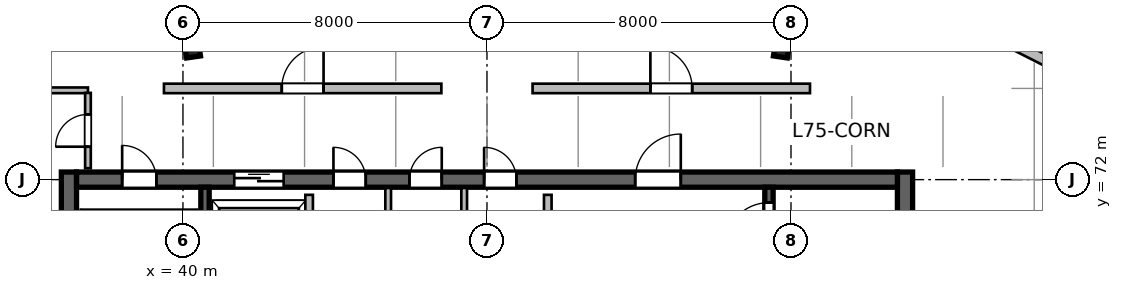
"""IFC4 building model, lengths in metres.
Left out: names, types, materials, properties, quantities, classifications, styles, units other than length and angle.
Written with IfcOpenShell. Run it as: python <this file> out.ifc"""

import sys

from ifc_helpers import new_model, si_unit, direction, frame, frame_2d, origin, origin_2d, place, context, subcontext, project, spatial, rectangle, i_section, extrude, source, transform, mapped, element, fill, save


model = new_model("IFC4")
c1 = context("Model", 3, precision=1e-05, world=origin(), true_north=direction((0.0, 1.0)))
c2 = subcontext(c1, "Body", "Model", "MODEL_VIEW")
j1 = project(units=[si_unit("LENGTHUNIT", "METRE"), si_unit("PLANEANGLEUNIT", "RADIAN")], contexts=[c1])
p1 = place(None, origin())
s1 = spatial("IfcSite", under=j1, at=p1, CompositionType="ELEMENT")
p2 = place(p1, origin())
s2 = spatial("IfcBuilding", under=s1, at=p2, CompositionType="ELEMENT")
p3 = place(p2, frame((0.0, 0.0, 307.8)))
s3 = spatial("IfcBuildingStorey", under=s2, at=p3, CompositionType="ELEMENT", Elevation=307.8)
m1 = source(origin(), c2, "Body", "SweptSolid", [
    extrude(rectangle(XDim=12.0, YDim=0.4, at=frame_2d((6.0, 0.0))), origin(), (0.0, 0.0, 1.0), 4.8),
])
for number, where, z_axis, x_axis in (
    (1, (37.0, 60.2, 0.0), (0.0, 0.0, 1.0), (0.0, 1.0, 0.0)),
    (2, (59.0, 60.2, 0.0), (0.0, 0.0, 1.0), (0.0, 1.0, 0.0)),
):
    element("IfcWall", number, at=place(p3, frame(where, z_axis=z_axis, x_axis=x_axis)), inside=s3, PredefinedType="SHEAR", context=c2, shape_type="MappedRepresentation", body=[
        mapped(m1, transform((0.0, 0.0, 0.0), scale=1.0)),
    ])
m2 = source(origin(), c2, "Body", "SweptSolid", [
    extrude(rectangle(XDim=21.6, YDim=0.4, at=frame_2d((10.8, 0.0))), origin(), (0.0, 0.0, 1.0), 4.8),
])
p4 = place(p3, frame((37.2, 72.0, 0.0), z_axis=(0.0, 0.0, 1.0), x_axis=(1.0, 0.0, 0.0)))
e3 = element("IfcWall", 3, at=p4, inside=s3, PredefinedType="SHEAR", context=c2, shape_type="MappedRepresentation", body=[
    mapped(m2, transform((0.0, 0.0, 0.0), scale=1.0)),
])
p5 = place(p4, frame((1.2, 0.0, 0.0)))
e4 = element("IfcOpeningElement", 4, at=p5, cuts=e3, PredefinedType="OPENING", context=c2, shape_type="SweptSolid", body=[
    extrude(rectangle(XDim=0.9, YDim=2.1, at=frame_2d((0.45, 1.05))), frame((0.0, 0.21, 0.0), z_axis=(0.0, -1.0, 0.0), x_axis=(1.0, 0.0, 0.0)), (0.0, 0.0, 1.0), 0.42),
])
p6 = place(p4, frame((14.7, 0.0, 0.0)))
e5 = element("IfcOpeningElement", 5, at=p6, cuts=e3, PredefinedType="OPENING", context=c2, shape_type="SweptSolid", body=[
    extrude(rectangle(XDim=1.2, YDim=2.15, at=frame_2d((0.6, 1.075))), frame((0.0, 0.21, 0.0), z_axis=(0.0, -1.0, 0.0), x_axis=(1.0, 0.0, 0.0)), (0.0, 0.0, 1.0), 0.42),
])
p7 = place(p4, frame((4.15, 0.0, 0.0)))
e6 = element("IfcOpeningElement", 6, at=p7, cuts=e3, PredefinedType="OPENING", context=c2, shape_type="SweptSolid", body=[
    extrude(rectangle(XDim=1.3, YDim=2.15, at=frame_2d((0.65, 1.075))), frame((0.0, 0.21, 0.0), z_axis=(0.0, -1.0, 0.0), x_axis=(1.0, 0.0, 0.0)), (0.0, 0.0, 1.0), 0.42),
])
p8 = place(p4, frame((6.76, 0.0, 0.0)))
e7 = element("IfcOpeningElement", 7, at=p8, cuts=e3, PredefinedType="OPENING", context=c2, shape_type="SweptSolid", body=[
    extrude(rectangle(XDim=0.85, YDim=2.1, at=frame_2d((0.425, 1.05))), frame((0.0, 0.21, 0.0), z_axis=(0.0, -1.0, 0.0), x_axis=(1.0, 0.0, 0.0)), (0.0, 0.0, 1.0), 0.42),
])
p9 = place(p4, frame((8.76, 0.0, 0.0)))
e8 = element("IfcOpeningElement", 8, at=p9, cuts=e3, PredefinedType="OPENING", context=c2, shape_type="SweptSolid", body=[
    extrude(rectangle(XDim=0.85, YDim=2.1, at=frame_2d((0.425, 1.05))), frame((0.0, 0.21, 0.0), z_axis=(0.0, -1.0, 0.0), x_axis=(1.0, 0.0, 0.0)), (0.0, 0.0, 1.0), 0.42),
])
p10 = place(p4, frame((10.725, 0.0, 0.0)))
e9 = element("IfcOpeningElement", 9, at=p10, cuts=e3, PredefinedType="OPENING", context=c2, shape_type="SweptSolid", body=[
    extrude(rectangle(XDim=0.85, YDim=2.1, at=frame_2d((0.425, 1.05))), frame((0.0, 0.21, 0.0), z_axis=(0.0, -1.0, 0.0), x_axis=(1.0, 0.0, 0.0)), (0.0, 0.0, 1.0), 0.42),
])
m3 = source(origin(), c2, "Body", "SweptSolid", [
    extrude(rectangle(XDim=11.2, YDim=0.22, at=frame_2d((5.6, 0.0))), origin(), (0.0, 0.0, 1.0), 4.8),
])
p11 = place(p3, frame((40.58, 60.6, 0.0), z_axis=(0.0, 0.0, 1.0), x_axis=(0.0, 1.0, 0.0)))
e10 = element("IfcWall", 10, at=p11, inside=s3, PredefinedType="SHEAR", context=c2, shape_type="MappedRepresentation", body=[
    mapped(m3, transform((0.0, 0.0, 0.0), scale=1.0)),
])
p12 = place(p3, frame((55.42, 60.6, 0.0), z_axis=(0.0, 0.0, 1.0), x_axis=(0.0, 1.0, 0.0)))
e11 = element("IfcWall", 11, at=p12, inside=s3, PredefinedType="SHEAR", context=c2, shape_type="MappedRepresentation", body=[
    mapped(m3, transform((0.0, 0.0, 0.0), scale=1.0)),
])
p13 = place(p12, frame((9.645, 0.0, 0.0)))
e12 = element("IfcOpeningElement", 12, at=p13, cuts=e11, PredefinedType="OPENING", context=c2, shape_type="SweptSolid", body=[
    extrude(rectangle(XDim=1.15, YDim=2.15, at=frame_2d((0.575, 1.075))), frame((0.0, 0.12, 0.0), z_axis=(0.0, -1.0, 0.0), x_axis=(1.0, 0.0, 0.0)), (0.0, 0.0, 1.0), 0.24),
])
m4 = source(origin(), c2, "Body", "SweptSolid", [
    extrude(i_section(OverallWidth=0.369, OverallDepth=0.356, WebThickness=0.011, FlangeThickness=0.018, at=origin_2d()), origin(), (0.0, 0.0, 1.0), 4.8),
])
for number, where, z_axis, x_axis in (
    (13, (40.253, 75.404, 0.0), (0.0, 0.0, 1.0), (-0.143, 0.99, 0.0)),
    (14, (55.747, 75.404, 0.0), (0.0, 0.0, 1.0), (0.143, 0.99, 0.0)),
):
    element("IfcColumn", number, at=place(p3, frame(where, z_axis=z_axis, x_axis=x_axis)), inside=s3, PredefinedType="COLUMN", context=c2, shape_type="MappedRepresentation", body=[
        mapped(m4, transform((0.0, 0.0, 0.0), scale=1.0)),
    ])
m5 = source(origin(), c2, "Body", "SweptSolid", [
    extrude(rectangle(XDim=2.706, YDim=0.28, at=frame_2d((1.353, 0.0))), origin(), (0.0, 0.0, 1.0), 4.5),
])
p14 = place(p3, frame((61.745, 75.62, 0.0), z_axis=(0.0, 0.0, 1.0), x_axis=(0.891648836287, -0.452727680564, 0.0)))
e15 = element("IfcWall", 15, at=p14, inside=s3, PredefinedType="SOLIDWALL", context=c2, shape_type="MappedRepresentation", body=[
    mapped(m5, transform((0.0, 0.0, 0.0), scale=1.0)),
])
m6 = source(origin(), c2, "Body", "SweptSolid", [
    extrude(rectangle(XDim=5.8, YDim=0.2, at=frame_2d((2.9, 0.0))), origin(), (0.0, 0.0, 1.0), 4.5),
])
p15 = place(p3, frame((49.6, 65.8, 0.0), z_axis=(0.0, 0.0, 1.0), x_axis=(0.0, 1.0, 0.0)))
e16 = element("IfcWall", 16, at=p15, inside=s3, PredefinedType="SOLIDWALL", context=c2, shape_type="MappedRepresentation", body=[
    mapped(m6, transform((0.0, 0.0, 0.0), scale=1.0)),
])
m7 = source(origin(), c2, "Body", "SweptSolid", [
    extrude(rectangle(XDim=3.2, YDim=0.2, at=frame_2d((1.6, 0.0))), origin(), (0.0, 0.0, 1.0), 4.5),
])
p16 = place(p3, frame((43.32, 68.4, 0.0), z_axis=(0.0, 0.0, 1.0), x_axis=(0.0, 1.0, 0.0)))
e17 = element("IfcWall", 17, at=p16, inside=s3, PredefinedType="SOLIDWALL", context=c2, shape_type="MappedRepresentation", body=[
    mapped(m7, transform((0.0, 0.0, 0.0), scale=1.0)),
])
m8 = source(origin(), c2, "Body", "SweptSolid", [
    extrude(rectangle(XDim=3.38, YDim=0.15, at=frame_2d((1.69, 0.0))), origin(), (0.0, 0.0, 1.0), 4.5),
])
for number, where, z_axis, x_axis in (
    (18, (45.4, 68.4, 0.0), (0.0, 0.0, 1.0), (0.0, 1.0, 0.0)),
    (19, (47.4, 68.4, 0.0), (0.0, 0.0, 1.0), (0.0, 1.0, 0.0)),
):
    element("IfcWall", number, at=place(p3, frame(where, z_axis=z_axis, x_axis=x_axis)), inside=s3, PredefinedType="PARTITIONING", context=c2, shape_type="MappedRepresentation", body=[
        mapped(m8, transform((0.0, 0.0, 0.0), scale=1.0)),
    ])
m9 = source(origin(), c2, "Body", "SweptSolid", [
    extrude(rectangle(XDim=3.1, YDim=0.15, at=frame_2d((1.55, 0.0))), origin(), (0.0, 0.0, 1.0), 3.931),
])
p17 = place(p3, frame((34.4, 74.35, 0.0), z_axis=(0.0, 0.0, 1.0), x_axis=(1.0, 0.0, 0.0)))
e20 = element("IfcWall", 20, at=p17, inside=s3, PredefinedType="PARTITIONING", context=c2, shape_type="MappedRepresentation", body=[
    mapped(m9, transform((0.0, 0.0, 0.0), scale=1.0)),
])
m10 = source(origin(), c2, "Body", "SweptSolid", [
    extrude(rectangle(XDim=1.982, YDim=0.15, at=frame_2d((0.991, 0.0))), origin(), (0.0, 0.0, 1.0), 4.5),
])
p18 = place(p3, frame((37.5, 72.3, 0.0), z_axis=(0.0, 0.0, 1.0), x_axis=(0.0, 1.0, 0.0)))
e21 = element("IfcWall", 21, at=p18, inside=s3, PredefinedType="PARTITIONING", context=c2, shape_type="MappedRepresentation", body=[
    mapped(m10, transform((0.0, 0.0, 0.0), scale=1.0)),
])
p19 = place(p18, frame((0.566, 0.0, 0.0)))
e22 = element("IfcOpeningElement", 22, at=p19, cuts=e21, PredefinedType="OPENING", context=c2, shape_type="SweptSolid", body=[
    extrude(rectangle(XDim=0.85, YDim=2.1, at=frame_2d((0.425, 1.05))), frame((0.0, 0.085, 0.0), z_axis=(0.0, -1.0, 0.0), x_axis=(1.0, 0.0, 0.0)), (0.0, 0.0, 1.0), 0.17),
])
m11 = source(origin(), c2, "Body", "SweptSolid", [
    extrude(rectangle(XDim=7.3, YDim=0.25, at=frame_2d((3.65, 0.0))), origin(), (0.0, 0.0, 1.0), 4.5),
])
p20 = place(p3, frame((39.5, 74.4, 0.0), z_axis=(0.0, 0.0, 1.0), x_axis=(1.0, 0.0, 0.0)))
e23 = element("IfcWall", 23, at=p20, inside=s3, PredefinedType="PARTITIONING", context=c2, shape_type="MappedRepresentation", body=[
    mapped(m11, transform((0.0, 0.0, 0.0), scale=1.0)),
])
p21 = place(p20, frame((3.1, 0.0, 0.0)))
e24 = element("IfcOpeningElement", 24, at=p21, cuts=e23, PredefinedType="OPENING", context=c2, shape_type="SweptSolid", body=[
    extrude(rectangle(XDim=1.1, YDim=2.15, at=frame_2d((0.55, 1.075))), frame((0.0, 0.135, 0.0), z_axis=(0.0, -1.0, 0.0), x_axis=(1.0, 0.0, 0.0)), (0.0, 0.0, 1.0), 0.27),
])
p22 = place(p3, frame((49.2, 74.4, 0.0), z_axis=(0.0, 0.0, 1.0), x_axis=(1.0, 0.0, 0.0)))
e25 = element("IfcWall", 25, at=p22, inside=s3, PredefinedType="PARTITIONING", context=c2, shape_type="MappedRepresentation", body=[
    mapped(m11, transform((0.0, 0.0, 0.0), scale=1.0)),
])
p23 = place(p22, frame((3.1, 0.0, 0.0)))
e26 = element("IfcOpeningElement", 26, at=p23, cuts=e25, PredefinedType="OPENING", context=c2, shape_type="SweptSolid", body=[
    extrude(rectangle(XDim=1.1, YDim=2.15, at=frame_2d((0.55, 1.075))), frame((0.0, 0.135, 0.0), z_axis=(0.0, -1.0, 0.0), x_axis=(1.0, 0.0, 0.0)), (0.0, 0.0, 1.0), 0.27),
])
m12 = source(origin(), c2, "Body", "SweptSolid", [
    extrude(rectangle(XDim=0.9, YDim=2.1, at=frame_2d((0.45, 1.05))), frame((0.0, 0.025, 0.0), z_axis=(0.0, -1.0, 0.0), x_axis=(1.0, 0.0, 0.0)), (0.0, 0.0, 1.0), 0.05),
])
p24 = place(p5, origin())
e27 = element("IfcDoor", 27, at=p24, inside=s3, OperationType="SINGLE_SWING_LEFT", PredefinedType="DOOR", context=c2, shape_type="MappedRepresentation", body=[
    mapped(m12, transform((0.0, 0.0, 0.0), scale=1.0)),
])
fill(e4, e27)
m13 = source(origin(), c2, "Body", "SweptSolid", [
    extrude(rectangle(XDim=1.15, YDim=2.15, at=frame_2d((0.575, 1.075))), frame((0.0, 0.025, 0.0), z_axis=(0.0, -1.0, 0.0), x_axis=(1.0, 0.0, 0.0)), (0.0, 0.0, 1.0), 0.05),
])
p25 = place(p13, origin())
e28 = element("IfcDoor", 28, at=p25, inside=s3, OperationType="SINGLE_SWING_LEFT", PredefinedType="DOOR", context=c2, shape_type="MappedRepresentation", body=[
    mapped(m13, transform((0.0, 0.0, 0.0), scale=1.0)),
])
fill(e12, e28)
m14 = source(origin(), c2, "Body", "SweptSolid", [
    extrude(rectangle(XDim=1.2, YDim=2.15, at=frame_2d((0.6, 1.075))), frame((0.0, 0.025, 0.0), z_axis=(0.0, -1.0, 0.0), x_axis=(1.0, 0.0, 0.0)), (0.0, 0.0, 1.0), 0.05),
])
p26 = place(p6, origin())
e29 = element("IfcDoor", 29, at=p26, inside=s3, OperationType="SINGLE_SWING_RIGHT", PredefinedType="DOOR", context=c2, shape_type="MappedRepresentation", body=[
    mapped(m14, transform((0.0, 0.0, 0.0), scale=1.0)),
])
fill(e5, e29)
m15 = source(origin(), c2, "Body", "SweptSolid", [
    extrude(rectangle(XDim=1.3, YDim=2.15, at=frame_2d((0.65, 1.075))), frame((0.0, 0.025, 0.0), z_axis=(0.0, -1.0, 0.0), x_axis=(1.0, 0.0, 0.0)), (0.0, 0.0, 1.0), 0.05),
])
p27 = place(p7, origin())
e30 = element("IfcDoor", 30, at=p27, inside=s3, OperationType="DOUBLE_DOOR_SLIDING", PredefinedType="DOOR", context=c2, shape_type="MappedRepresentation", body=[
    mapped(m15, transform((0.0, 0.0, 0.0), scale=1.0)),
])
fill(e6, e30)
m16 = source(origin(), c2, "Body", "SweptSolid", [
    extrude(rectangle(XDim=0.85, YDim=2.1, at=frame_2d((0.425, 1.05))), frame((0.0, 0.025, 0.0), z_axis=(0.0, -1.0, 0.0), x_axis=(1.0, 0.0, 0.0)), (0.0, 0.0, 1.0), 0.05),
])
p28 = place(p8, origin())
e31 = element("IfcDoor", 31, at=p28, inside=s3, OperationType="SINGLE_SWING_LEFT", PredefinedType="DOOR", context=c2, shape_type="MappedRepresentation", body=[
    mapped(m16, transform((0.0, 0.0, 0.0), scale=1.0)),
])
fill(e7, e31)
p29 = place(p9, origin())
e32 = element("IfcDoor", 32, at=p29, inside=s3, OperationType="SINGLE_SWING_RIGHT", PredefinedType="DOOR", context=c2, shape_type="MappedRepresentation", body=[
    mapped(m16, transform((0.0, 0.0, 0.0), scale=1.0)),
])
fill(e8, e32)
p30 = place(p10, origin())
e33 = element("IfcDoor", 33, at=p30, inside=s3, OperationType="SINGLE_SWING_LEFT", PredefinedType="DOOR", context=c2, shape_type="MappedRepresentation", body=[
    mapped(m16, transform((0.0, 0.0, 0.0), scale=1.0)),
])
fill(e9, e33)
p31 = place(p19, origin())
e34 = element("IfcDoor", 34, at=p31, inside=s3, OperationType="SINGLE_SWING_LEFT", PredefinedType="DOOR", context=c2, shape_type="MappedRepresentation", body=[
    mapped(m16, transform((0.0, 0.0, 0.0), scale=1.0)),
])
fill(e22, e34)
m17 = source(origin(), c2, "Body", "SweptSolid", [
    extrude(rectangle(XDim=1.1, YDim=2.15, at=frame_2d((0.55, 1.075))), frame((0.0, 0.025, 0.0), z_axis=(0.0, -1.0, 0.0), x_axis=(1.0, 0.0, 0.0)), (0.0, 0.0, 1.0), 0.05),
])
p32 = place(p21, origin())
e35 = element("IfcDoor", 35, at=p32, inside=s3, OperationType="SINGLE_SWING_RIGHT", PredefinedType="DOOR", context=c2, shape_type="MappedRepresentation", body=[
    mapped(m17, transform((0.0, 0.0, 0.0), scale=1.0)),
])
fill(e24, e35)
p33 = place(p23, origin())
e36 = element("IfcDoor", 36, at=p33, inside=s3, OperationType="SINGLE_SWING_LEFT", PredefinedType="DOOR", context=c2, shape_type="MappedRepresentation", body=[
    mapped(m17, transform((0.0, 0.0, 0.0), scale=1.0)),
])
fill(e26, e36)
save(model, sys.argv[1])
